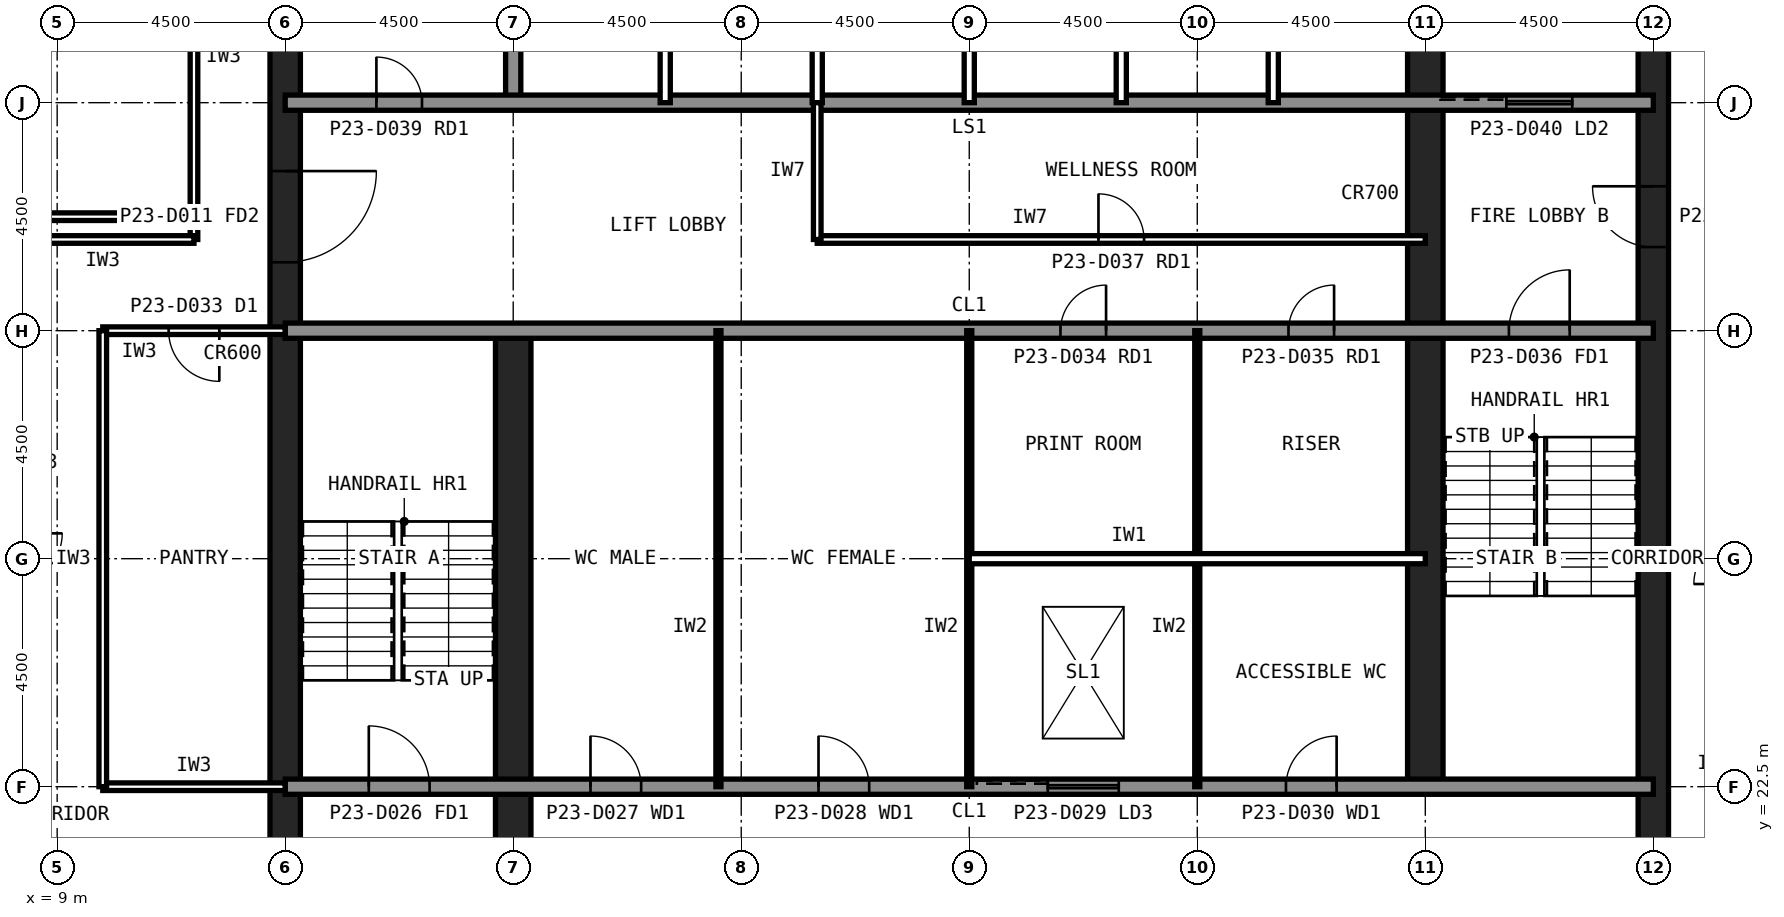
"""IFC4 building model, lengths in metres.
Left out: names, types, materials, properties, quantities, classifications, styles, units other than length and angle.
Written with IfcOpenShell. Run it as: python <this file> out.ifc"""

import sys

from ifc_helpers import new_model, si_unit, direction, frame, frame_2d, origin, place, context, subcontext, project, spatial, rectangle, extrude, element, fill, save


model = new_model("IFC4")
c1 = context("Model", 3, precision=1e-05, world=origin(), true_north=direction((0.0, 1.0)))
c2 = subcontext(c1, "Body", "Model", "MODEL_VIEW")
j1 = project(units=[si_unit("LENGTHUNIT", "METRE"), si_unit("PLANEANGLEUNIT", "RADIAN")], contexts=[c1])
p1 = place(None, origin())
s1 = spatial("IfcSite", under=j1, at=p1, CompositionType="ELEMENT")
p2 = place(p1, origin())
s2 = spatial("IfcBuilding", under=s1, at=p2, CompositionType="ELEMENT")
p3 = place(p2, frame((0.0, 0.0, 96.2)))
s3 = spatial("IfcBuildingStorey", under=s2, at=p3, CompositionType="ELEMENT", Elevation=96.2)
p4 = place(p3, frame((40.5, 13.5, 0.0), z_axis=(0.0, 0.0, 1.0), x_axis=(0.0, 1.0, 0.0)))
e1 = element("IfcWall", 1, at=p4, inside=s3, PredefinedType="SHEAR", context=c2, shape_type="SweptSolid", body=[
    extrude(rectangle(XDim=27.0, YDim=0.6, at=frame_2d((13.5, 0.0))), origin(), (0.0, 0.0, 1.0), 4.2),
])
p5 = place(p4, frame((5.85, 0.0, 0.0)))
e2 = element("IfcOpeningElement", 2, at=p5, cuts=e1, PredefinedType="OPENING", context=c2, shape_type="SweptSolid", body=[
    extrude(rectangle(XDim=1.8, YDim=2.1, at=frame_2d((0.9, 1.05))), frame((0.0, 0.31, 0.0), z_axis=(0.0, -1.0, 0.0), x_axis=(1.0, 0.0, 0.0)), (0.0, 0.0, 1.0), 0.62),
])
p6 = place(p4, frame((19.65, 0.0, 0.0)))
e3 = element("IfcOpeningElement", 3, at=p6, cuts=e1, PredefinedType="OPENING", context=c2, shape_type="SweptSolid", body=[
    extrude(rectangle(XDim=1.2, YDim=2.1, at=frame_2d((0.6, 1.05))), frame((0.0, 0.31, 0.0), z_axis=(0.0, -1.0, 0.0), x_axis=(1.0, 0.0, 0.0)), (0.0, 0.0, 1.0), 0.62),
])
p7 = place(p3, frame((13.5, 40.5, 0.0), z_axis=(0.0, 0.0, 1.0), x_axis=(0.0, -1.0, 0.0)))
e4 = element("IfcWall", 4, at=p7, inside=s3, PredefinedType="SHEAR", context=c2, shape_type="SweptSolid", body=[
    extrude(rectangle(XDim=27.0, YDim=0.6, at=frame_2d((13.5, 0.0))), origin(), (0.0, 0.0, 1.0), 4.2),
])
p8 = place(p7, frame((19.65, 0.0, 0.0)))
e5 = element("IfcOpeningElement", 5, at=p8, cuts=e4, PredefinedType="OPENING", context=c2, shape_type="SweptSolid", body=[
    extrude(rectangle(XDim=1.2, YDim=2.1, at=frame_2d((0.6, 1.05))), frame((0.0, 0.31, 0.0), z_axis=(0.0, -1.0, 0.0), x_axis=(1.0, 0.0, 0.0)), (0.0, 0.0, 1.0), 0.62),
])
p9 = place(p7, frame((5.85, 0.0, 0.0)))
e6 = element("IfcOpeningElement", 6, at=p9, cuts=e4, PredefinedType="OPENING", context=c2, shape_type="SweptSolid", body=[
    extrude(rectangle(XDim=1.8, YDim=2.1, at=frame_2d((0.9, 1.05))), frame((0.0, 0.31, 0.0), z_axis=(0.0, -1.0, 0.0), x_axis=(1.0, 0.0, 0.0)), (0.0, 0.0, 1.0), 0.62),
])
p10 = place(p3, frame((18.0, 13.5, 0.0), z_axis=(0.0, 0.0, 1.0), x_axis=(0.0, 1.0, 0.0)))
e7 = element("IfcWall", 7, at=p10, inside=s3, PredefinedType="SHEAR", context=c2, shape_type="SweptSolid", body=[
    extrude(rectangle(XDim=18.0, YDim=0.7, at=frame_2d((9.0, 0.0))), origin(), (0.0, 0.0, 1.0), 4.2),
])
p11 = place(p3, frame((18.0, 36.0, 0.0), z_axis=(0.0, 0.0, 1.0), x_axis=(0.0, 1.0, 0.0)))
e8 = element("IfcWall", 8, at=p11, inside=s3, PredefinedType="SOLIDWALL", context=c2, shape_type="SweptSolid", body=[
    extrude(rectangle(XDim=4.5, YDim=0.3, at=frame_2d((2.25, 0.0))), origin(), (0.0, 0.0, 1.0), 4.04),
])
p12 = place(p3, frame((36.0, 22.5, 0.0), z_axis=(0.0, 0.0, 1.0), x_axis=(0.0, 1.0, 0.0)))
e9 = element("IfcWall", 9, at=p12, inside=s3, PredefinedType="SHEAR", context=c2, shape_type="SweptSolid", body=[
    extrude(rectangle(XDim=18.0, YDim=0.7, at=frame_2d((9.0, 0.0))), origin(), (0.0, 0.0, 1.0), 4.2),
])
p13 = place(p3, frame((13.5, 36.0, 0.0), z_axis=(0.0, 0.0, 1.0), x_axis=(1.0, 0.0, 0.0)))
e10 = element("IfcWall", 10, at=p13, inside=s3, PredefinedType="SOLIDWALL", context=c2, shape_type="SweptSolid", body=[
    extrude(rectangle(XDim=27.0, YDim=0.3, at=frame_2d((13.5, 0.0))), origin(), (0.0, 0.0, 1.0), 4.04),
])
p14 = place(p13, frame((1.8, 0.0, 0.0)))
e11 = element("IfcOpeningElement", 11, at=p14, cuts=e10, PredefinedType="OPENING", context=c2, shape_type="SweptSolid", body=[
    extrude(rectangle(XDim=0.9, YDim=2.1, at=frame_2d((0.45, 1.05))), frame((0.0, 0.16, 0.0), z_axis=(0.0, -1.0, 0.0), x_axis=(1.0, 0.0, 0.0)), (0.0, 0.0, 1.0), 0.32),
])
p15 = place(p13, frame((24.1, 0.0, 0.0)))
e12 = element("IfcOpeningElement", 12, at=p15, cuts=e10, PredefinedType="OPENING", context=c2, shape_type="SweptSolid", body=[
    extrude(rectangle(XDim=1.3, YDim=2.2, at=frame_2d((0.65, 1.1))), frame((0.0, 0.16, 0.0), z_axis=(0.0, -1.0, 0.0), x_axis=(1.0, 0.0, 0.0)), (0.0, 0.0, 1.0), 0.32),
])
p16 = place(p3, frame((13.5, 22.5, 0.0), z_axis=(0.0, 0.0, 1.0), x_axis=(1.0, 0.0, 0.0)))
e13 = element("IfcWall", 13, at=p16, inside=s3, PredefinedType="SOLIDWALL", context=c2, shape_type="SweptSolid", body=[
    extrude(rectangle(XDim=27.0, YDim=0.3, at=frame_2d((13.5, 0.0))), origin(), (0.0, 0.0, 1.0), 4.04),
])
p17 = place(p16, frame((1.65, 0.0, 0.0)))
e14 = element("IfcOpeningElement", 14, at=p17, cuts=e13, PredefinedType="OPENING", context=c2, shape_type="SweptSolid", body=[
    extrude(rectangle(XDim=1.2, YDim=2.1, at=frame_2d((0.6, 1.05))), frame((0.0, 0.16, 0.0), z_axis=(0.0, -1.0, 0.0), x_axis=(1.0, 0.0, 0.0)), (0.0, 0.0, 1.0), 0.32),
])
p18 = place(p16, frame((6.025, 0.0, 0.0)))
e15 = element("IfcOpeningElement", 15, at=p18, cuts=e13, PredefinedType="OPENING", context=c2, shape_type="SweptSolid", body=[
    extrude(rectangle(XDim=1.0, YDim=2.1, at=frame_2d((0.5, 1.05))), frame((0.0, 0.16, 0.0), z_axis=(0.0, -1.0, 0.0), x_axis=(1.0, 0.0, 0.0)), (0.0, 0.0, 1.0), 0.32),
])
p19 = place(p16, frame((10.525, 0.0, 0.0)))
e16 = element("IfcOpeningElement", 16, at=p19, cuts=e13, PredefinedType="OPENING", context=c2, shape_type="SweptSolid", body=[
    extrude(rectangle(XDim=1.0, YDim=2.1, at=frame_2d((0.5, 1.05))), frame((0.0, 0.16, 0.0), z_axis=(0.0, -1.0, 0.0), x_axis=(1.0, 0.0, 0.0)), (0.0, 0.0, 1.0), 0.32),
])
p20 = place(p16, frame((19.75, 0.0, 0.0)))
e17 = element("IfcOpeningElement", 17, at=p20, cuts=e13, PredefinedType="OPENING", context=c2, shape_type="SweptSolid", body=[
    extrude(rectangle(XDim=1.0, YDim=2.1, at=frame_2d((0.5, 1.05))), frame((0.0, 0.16, 0.0), z_axis=(0.0, -1.0, 0.0), x_axis=(1.0, 0.0, 0.0)), (0.0, 0.0, 1.0), 0.32),
])
p21 = place(p16, frame((15.05, 0.0, 0.0)))
e18 = element("IfcOpeningElement", 18, at=p21, cuts=e13, PredefinedType="OPENING", context=c2, shape_type="SweptSolid", body=[
    extrude(rectangle(XDim=1.4, YDim=2.4, at=frame_2d((0.7, 1.2))), frame((0.0, 0.16, 0.0), z_axis=(0.0, -1.0, 0.0), x_axis=(1.0, 0.0, 0.0)), (0.0, 0.0, 1.0), 0.32),
])
p22 = place(p3, frame((13.5, 31.5, 0.0), z_axis=(0.0, 0.0, 1.0), x_axis=(1.0, 0.0, 0.0)))
e19 = element("IfcWall", 19, at=p22, inside=s3, PredefinedType="SOLIDWALL", context=c2, shape_type="SweptSolid", body=[
    extrude(rectangle(XDim=27.0, YDim=0.3, at=frame_2d((13.5, 0.0))), origin(), (0.0, 0.0, 1.0), 4.04),
])
p23 = place(p22, frame((24.15, 0.0, 0.0)))
e20 = element("IfcOpeningElement", 20, at=p23, cuts=e19, PredefinedType="OPENING", context=c2, shape_type="SweptSolid", body=[
    extrude(rectangle(XDim=1.2, YDim=2.1, at=frame_2d((0.6, 1.05))), frame((0.0, 0.16, 0.0), z_axis=(0.0, -1.0, 0.0), x_axis=(1.0, 0.0, 0.0)), (0.0, 0.0, 1.0), 0.32),
])
p24 = place(p22, frame((15.3, 0.0, 0.0)))
e21 = element("IfcOpeningElement", 21, at=p24, cuts=e19, PredefinedType="OPENING", context=c2, shape_type="SweptSolid", body=[
    extrude(rectangle(XDim=0.9, YDim=2.1, at=frame_2d((0.45, 1.05))), frame((0.0, 0.16, 0.0), z_axis=(0.0, -1.0, 0.0), x_axis=(1.0, 0.0, 0.0)), (0.0, 0.0, 1.0), 0.32),
])
p25 = place(p22, frame((19.8, 0.0, 0.0)))
e22 = element("IfcOpeningElement", 22, at=p25, cuts=e19, PredefinedType="OPENING", context=c2, shape_type="SweptSolid", body=[
    extrude(rectangle(XDim=0.9, YDim=2.1, at=frame_2d((0.45, 1.05))), frame((0.0, 0.16, 0.0), z_axis=(0.0, -1.0, 0.0), x_axis=(1.0, 0.0, 0.0)), (0.0, 0.0, 1.0), 0.32),
])
for number, where, z_axis, x_axis in (
    (23, (21.0, 36.0, 0.0), (0.0, 0.0, 1.0), (0.0, 1.0, 0.0)),
    (24, (24.0, 36.0, 0.0), (0.0, 0.0, 1.0), (0.0, 1.0, 0.0)),
    (25, (27.0, 36.0, 0.0), (0.0, 0.0, 1.0), (0.0, 1.0, 0.0)),
    (26, (30.0, 36.0, 0.0), (0.0, 0.0, 1.0), (0.0, 1.0, 0.0)),
    (27, (33.0, 36.0, 0.0), (0.0, 0.0, 1.0), (0.0, 1.0, 0.0)),
):
    element("IfcWall", number, at=place(p3, frame(where, z_axis=z_axis, x_axis=x_axis)), inside=s3, PredefinedType="PARTITIONING", context=c2, shape_type="SweptSolid", body=[
        extrude(rectangle(XDim=4.5, YDim=0.2, at=frame_2d((2.25, 0.0))), origin(), (0.0, 0.0, 1.0), 4.04),
    ])
for number, where, z_axis, x_axis in (
    (28, (22.05, 22.5, 0.0), (0.0, 0.0, 1.0), (0.0, 1.0, 0.0)),
    (29, (27.0, 22.5, 0.0), (0.0, 0.0, 1.0), (0.0, 1.0, 0.0)),
    (30, (31.5, 22.5, 0.0), (0.0, 0.0, 1.0), (0.0, 1.0, 0.0)),
):
    element("IfcWall", number, at=place(p3, frame(where, z_axis=z_axis, x_axis=x_axis)), inside=s3, PredefinedType="PLUMBINGWALL", context=c2, shape_type="SweptSolid", body=[
        extrude(rectangle(XDim=9.0, YDim=0.1, at=frame_2d((4.5, 0.0))), origin(), (0.0, 0.0, 1.0), 4.04),
    ])
p26 = place(p3, frame((27.0, 27.0, 0.0), z_axis=(0.0, 0.0, 1.0), x_axis=(1.0, 0.0, 0.0)))
e31 = element("IfcWall", 31, at=p26, inside=s3, PredefinedType="PARTITIONING", context=c2, shape_type="SweptSolid", body=[
    extrude(rectangle(XDim=9.0, YDim=0.2, at=frame_2d((4.5, 0.0))), origin(), (0.0, 0.0, 1.0), 4.04),
])
p27 = place(p3, frame((18.0, 33.3, 0.0), z_axis=(0.0, 0.0, 1.0), x_axis=(1.0, 0.0, 0.0)))
e32 = element("IfcWall", 32, at=p27, inside=s3, PredefinedType="PARTITIONING", context=c2, shape_type="SweptSolid", body=[
    extrude(rectangle(XDim=18.0, YDim=0.15, at=frame_2d((9.0, 0.0))), origin(), (0.0, 0.0, 1.0), 4.04),
])
p28 = place(p27, frame((1.8, 0.0, 0.0)))
e33 = element("IfcOpeningElement", 33, at=p28, cuts=e32, PredefinedType="OPENING", context=c2, shape_type="SweptSolid", body=[
    extrude(rectangle(XDim=0.9, YDim=2.1, at=frame_2d((0.45, 1.05))), frame((0.0, 0.085, 0.0), z_axis=(0.0, -1.0, 0.0), x_axis=(1.0, 0.0, 0.0)), (0.0, 0.0, 1.0), 0.17),
])
p29 = place(p27, frame((7.8, 0.0, 0.0)))
e34 = element("IfcOpeningElement", 34, at=p29, cuts=e32, PredefinedType="OPENING", context=c2, shape_type="SweptSolid", body=[
    extrude(rectangle(XDim=0.9, YDim=2.1, at=frame_2d((0.45, 1.05))), frame((0.0, 0.085, 0.0), z_axis=(0.0, -1.0, 0.0), x_axis=(1.0, 0.0, 0.0)), (0.0, 0.0, 1.0), 0.17),
])
p30 = place(p27, frame((14.55, 0.0, 0.0)))
e35 = element("IfcOpeningElement", 35, at=p30, cuts=e32, PredefinedType="OPENING", context=c2, shape_type="SweptSolid", body=[
    extrude(rectangle(XDim=0.9, YDim=2.1, at=frame_2d((0.45, 1.05))), frame((0.0, 0.085, 0.0), z_axis=(0.0, -1.0, 0.0), x_axis=(1.0, 0.0, 0.0)), (0.0, 0.0, 1.0), 0.17),
])
for number, where, z_axis, x_axis in (
    (36, (18.0, 33.3, 0.0), (0.0, 0.0, 1.0), (0.0, 1.0, 0.0)),
    (37, (22.5, 33.3, 0.0), (0.0, 0.0, 1.0), (0.0, 1.0, 0.0)),
    (38, (30.0, 33.3, 0.0), (0.0, 0.0, 1.0), (0.0, 1.0, 0.0)),
):
    element("IfcWall", number, at=place(p3, frame(where, z_axis=z_axis, x_axis=x_axis)), inside=s3, PredefinedType="PARTITIONING", context=c2, shape_type="SweptSolid", body=[
        extrude(rectangle(XDim=2.7, YDim=0.15, at=frame_2d((1.35, 0.0))), origin(), (0.0, 0.0, 1.0), 4.04),
    ])
p31 = place(p3, frame((11.7, 42.3, 0.0), z_axis=(0.0, 0.0, 1.0), x_axis=(0.0, -1.0, 0.0)))
e39 = element("IfcWall", 39, at=p31, inside=s3, PredefinedType="PARTITIONING", context=c2, shape_type="SweptSolid", body=[
    extrude(rectangle(XDim=9.0, YDim=0.15, at=frame_2d((4.5, 0.0))), origin(), (0.0, 0.0, 1.0), 4.04),
])
p32 = place(p3, frame((11.7, 33.3, 0.0), z_axis=(0.0, 0.0, 1.0), x_axis=(-1.0, 0.0, 0.0)))
e40 = element("IfcWall", 40, at=p32, inside=s3, PredefinedType="PARTITIONING", context=c2, shape_type="SweptSolid", body=[
    extrude(rectangle(XDim=3.6, YDim=0.15, at=frame_2d((1.8, 0.0))), origin(), (0.0, 0.0, 1.0), 4.04),
])
p33 = place(p3, frame((9.9, 22.5, 0.0), z_axis=(0.0, 0.0, 1.0), x_axis=(1.0, 0.0, 0.0)))
e41 = element("IfcWall", 41, at=p33, inside=s3, PredefinedType="PARTITIONING", context=c2, shape_type="SweptSolid", body=[
    extrude(rectangle(XDim=3.6, YDim=0.15, at=frame_2d((1.8, 0.0))), origin(), (0.0, 0.0, 1.0), 3.189),
])
p34 = place(p3, frame((13.5, 31.5, 0.0), z_axis=(0.0, 0.0, 1.0), x_axis=(-1.0, 0.0, 0.0)))
e42 = element("IfcWall", 42, at=p34, inside=s3, PredefinedType="PARTITIONING", context=c2, shape_type="SweptSolid", body=[
    extrude(rectangle(XDim=3.6, YDim=0.15, at=frame_2d((1.8, 0.0))), origin(), (0.0, 0.0, 1.0), 3.189),
])
p35 = place(p34, frame((1.3, 0.0, 0.0)))
e43 = element("IfcOpeningElement", 43, at=p35, cuts=e42, PredefinedType="OPENING", context=c2, shape_type="SweptSolid", body=[
    extrude(rectangle(XDim=1.0, YDim=2.1, at=frame_2d((0.5, 1.05))), frame((0.0, 0.085, 0.0), z_axis=(0.0, -1.0, 0.0), x_axis=(1.0, 0.0, 0.0)), (0.0, 0.0, 1.0), 0.17),
])
p36 = place(p3, frame((9.9, 31.5, 0.0), z_axis=(0.0, 0.0, 1.0), x_axis=(0.0, -1.0, 0.0)))
e44 = element("IfcWall", 44, at=p36, inside=s3, PredefinedType="PARTITIONING", context=c2, shape_type="SweptSolid", body=[
    extrude(rectangle(XDim=9.0, YDim=0.15, at=frame_2d((4.5, 0.0))), origin(), (0.0, 0.0, 1.0), 4.04),
])
p37 = place(p3, frame((11.7, 33.75, 0.0), z_axis=(0.0, 0.0, 1.0), x_axis=(-1.0, 0.0, 0.0)))
e45 = element("IfcWall", 45, at=p37, inside=s3, PredefinedType="PARTITIONING", context=c2, shape_type="SweptSolid", body=[
    extrude(rectangle(XDim=12.22, YDim=0.15, at=frame_2d((6.11, 0.0))), origin(), (0.0, 0.0, 1.0), 4.04),
])
p38 = place(p37, frame((5.35, 0.0, 0.0)))
e46 = element("IfcOpeningElement", 46, at=p38, cuts=e45, PredefinedType="OPENING", context=c2, shape_type="SweptSolid", body=[
    extrude(rectangle(XDim=1.0, YDim=2.1, at=frame_2d((0.5, 1.05))), frame((0.0, 0.085, 0.0), z_axis=(0.0, -1.0, 0.0), x_axis=(1.0, 0.0, 0.0)), (0.0, 0.0, 1.0), 0.17),
])
p39 = place(p9, origin())
e47 = element("IfcDoor", 47, at=p39, inside=s3, OperationType="SINGLE_SWING_LEFT", PredefinedType="DOOR", context=c2, shape_type="SweptSolid", body=[
    extrude(rectangle(XDim=1.8, YDim=2.1, at=frame_2d((0.9, 1.05))), frame((0.0, 0.025, 0.0), z_axis=(0.0, -1.0, 0.0), x_axis=(1.0, 0.0, 0.0)), (0.0, 0.0, 1.0), 0.05),
])
fill(e6, e47)
p40 = place(p6, origin())
e48 = element("IfcDoor", 48, at=p40, inside=s3, OperationType="SINGLE_SWING_RIGHT", PredefinedType="DOOR", context=c2, shape_type="SweptSolid", body=[
    extrude(rectangle(XDim=1.2, YDim=2.1, at=frame_2d((0.6, 1.05))), frame((0.0, 0.025, 0.0), z_axis=(0.0, -1.0, 0.0), x_axis=(1.0, 0.0, 0.0)), (0.0, 0.0, 1.0), 0.05),
])
fill(e3, e48)
p41 = place(p17, origin())
e49 = element("IfcDoor", 49, at=p41, inside=s3, OperationType="SINGLE_SWING_LEFT", PredefinedType="DOOR", context=c2, shape_type="SweptSolid", body=[
    extrude(rectangle(XDim=1.2, YDim=2.1, at=frame_2d((0.6, 1.05))), frame((0.0, 0.025, 0.0), z_axis=(0.0, -1.0, 0.0), x_axis=(1.0, 0.0, 0.0)), (0.0, 0.0, 1.0), 0.05),
])
fill(e14, e49)
p42 = place(p23, origin())
e50 = element("IfcDoor", 50, at=p42, inside=s3, OperationType="SINGLE_SWING_RIGHT", PredefinedType="DOOR", context=c2, shape_type="SweptSolid", body=[
    extrude(rectangle(XDim=1.2, YDim=2.1, at=frame_2d((0.6, 1.05))), frame((0.0, 0.025, 0.0), z_axis=(0.0, -1.0, 0.0), x_axis=(1.0, 0.0, 0.0)), (0.0, 0.0, 1.0), 0.05),
])
fill(e20, e50)
p43 = place(p18, origin())
e51 = element("IfcDoor", 51, at=p43, inside=s3, OperationType="SINGLE_SWING_LEFT", PredefinedType="DOOR", context=c2, shape_type="SweptSolid", body=[
    extrude(rectangle(XDim=1.0, YDim=2.1, at=frame_2d((0.5, 1.05))), frame((0.0, 0.025, 0.0), z_axis=(0.0, -1.0, 0.0), x_axis=(1.0, 0.0, 0.0)), (0.0, 0.0, 1.0), 0.05),
])
fill(e15, e51)
p44 = place(p19, origin())
e52 = element("IfcDoor", 52, at=p44, inside=s3, OperationType="SINGLE_SWING_LEFT", PredefinedType="DOOR", context=c2, shape_type="SweptSolid", body=[
    extrude(rectangle(XDim=1.0, YDim=2.1, at=frame_2d((0.5, 1.05))), frame((0.0, 0.025, 0.0), z_axis=(0.0, -1.0, 0.0), x_axis=(1.0, 0.0, 0.0)), (0.0, 0.0, 1.0), 0.05),
])
fill(e16, e52)
p45 = place(p20, origin())
e53 = element("IfcDoor", 53, at=p45, inside=s3, OperationType="SINGLE_SWING_RIGHT", PredefinedType="DOOR", context=c2, shape_type="SweptSolid", body=[
    extrude(rectangle(XDim=1.0, YDim=2.1, at=frame_2d((0.5, 1.05))), frame((0.0, 0.025, 0.0), z_axis=(0.0, -1.0, 0.0), x_axis=(1.0, 0.0, 0.0)), (0.0, 0.0, 1.0), 0.05),
])
fill(e17, e53)
p46 = place(p24, origin())
e54 = element("IfcDoor", 54, at=p46, inside=s3, OperationType="SINGLE_SWING_RIGHT", PredefinedType="DOOR", context=c2, shape_type="SweptSolid", body=[
    extrude(rectangle(XDim=0.9, YDim=2.1, at=frame_2d((0.45, 1.05))), frame((0.0, 0.025, 0.0), z_axis=(0.0, -1.0, 0.0), x_axis=(1.0, 0.0, 0.0)), (0.0, 0.0, 1.0), 0.05),
])
fill(e21, e54)
p47 = place(p25, origin())
e55 = element("IfcDoor", 55, at=p47, inside=s3, OperationType="SINGLE_SWING_RIGHT", PredefinedType="DOOR", context=c2, shape_type="SweptSolid", body=[
    extrude(rectangle(XDim=0.9, YDim=2.1, at=frame_2d((0.45, 1.05))), frame((0.0, 0.025, 0.0), z_axis=(0.0, -1.0, 0.0), x_axis=(1.0, 0.0, 0.0)), (0.0, 0.0, 1.0), 0.05),
])
fill(e22, e55)
p48 = place(p14, origin())
e56 = element("IfcDoor", 56, at=p48, inside=s3, OperationType="SINGLE_SWING_LEFT", PredefinedType="DOOR", context=c2, shape_type="SweptSolid", body=[
    extrude(rectangle(XDim=0.9, YDim=2.1, at=frame_2d((0.45, 1.05))), frame((0.0, 0.025, 0.0), z_axis=(0.0, -1.0, 0.0), x_axis=(1.0, 0.0, 0.0)), (0.0, 0.0, 1.0), 0.05),
])
fill(e11, e56)
p49 = place(p28, origin())
e57 = element("IfcDoor", 57, at=p49, inside=s3, OperationType="SINGLE_SWING_LEFT", PredefinedType="DOOR", context=c2, shape_type="SweptSolid", body=[
    extrude(rectangle(XDim=0.9, YDim=2.1, at=frame_2d((0.45, 1.05))), frame((0.0, 0.025, 0.0), z_axis=(0.0, -1.0, 0.0), x_axis=(1.0, 0.0, 0.0)), (0.0, 0.0, 1.0), 0.05),
])
fill(e33, e57)
p50 = place(p29, origin())
e58 = element("IfcDoor", 58, at=p50, inside=s3, OperationType="SINGLE_SWING_LEFT", PredefinedType="DOOR", context=c2, shape_type="SweptSolid", body=[
    extrude(rectangle(XDim=0.9, YDim=2.1, at=frame_2d((0.45, 1.05))), frame((0.0, 0.025, 0.0), z_axis=(0.0, -1.0, 0.0), x_axis=(1.0, 0.0, 0.0)), (0.0, 0.0, 1.0), 0.05),
])
fill(e34, e58)
p51 = place(p30, origin())
e59 = element("IfcDoor", 59, at=p51, inside=s3, OperationType="SINGLE_SWING_RIGHT", PredefinedType="DOOR", context=c2, shape_type="SweptSolid", body=[
    extrude(rectangle(XDim=0.9, YDim=2.1, at=frame_2d((0.45, 1.05))), frame((0.0, 0.025, 0.0), z_axis=(0.0, -1.0, 0.0), x_axis=(1.0, 0.0, 0.0)), (0.0, 0.0, 1.0), 0.05),
])
fill(e35, e59)
p52 = place(p15, origin())
e60 = element("IfcDoor", 60, at=p52, inside=s3, OperationType="SLIDING_TO_LEFT", PredefinedType="DOOR", context=c2, shape_type="SweptSolid", body=[
    extrude(rectangle(XDim=1.3, YDim=2.2, at=frame_2d((0.65, 1.1))), frame((0.0, 0.025, 0.0), z_axis=(0.0, -1.0, 0.0), x_axis=(1.0, 0.0, 0.0)), (0.0, 0.0, 1.0), 0.05),
])
fill(e12, e60)
p53 = place(p21, origin())
e61 = element("IfcDoor", 61, at=p53, inside=s3, OperationType="SLIDING_TO_LEFT", PredefinedType="DOOR", context=c2, shape_type="SweptSolid", body=[
    extrude(rectangle(XDim=1.4, YDim=2.4, at=frame_2d((0.7, 1.2))), frame((0.0, 0.025, 0.0), z_axis=(0.0, -1.0, 0.0), x_axis=(1.0, 0.0, 0.0)), (0.0, 0.0, 1.0), 0.05),
])
fill(e18, e61)
p54 = place(p35, origin())
e62 = element("IfcDoor", 62, at=p54, inside=s3, OperationType="SINGLE_SWING_LEFT", PredefinedType="DOOR", context=c2, shape_type="SweptSolid", body=[
    extrude(rectangle(XDim=1.0, YDim=2.1, at=frame_2d((0.5, 1.05))), frame((0.0, 0.025, 0.0), z_axis=(0.0, -1.0, 0.0), x_axis=(1.0, 0.0, 0.0)), (0.0, 0.0, 1.0), 0.05),
])
fill(e43, e62)
save(model, sys.argv[1])
